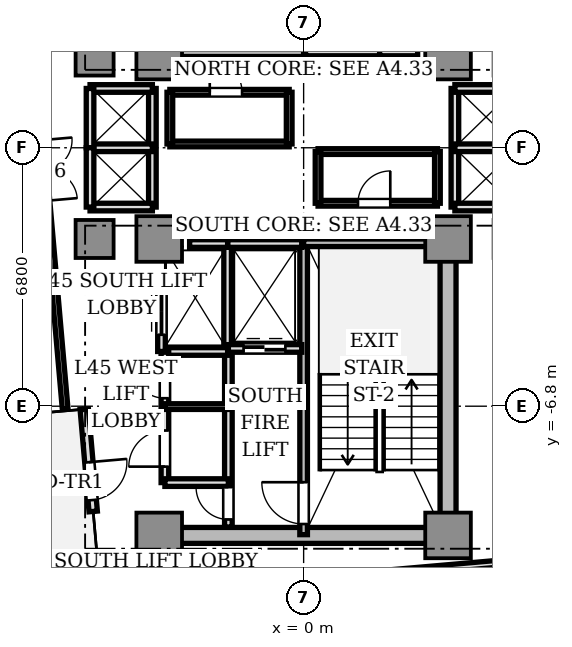
"""IFC4 building model, lengths in metres.
Left out: names, types, materials, properties, quantities, classifications, styles, units other than length and angle.
Written with IfcOpenShell. Run it as: python <this file> out.ifc"""

import sys

from ifc_helpers import new_model, si_unit, direction, frame, frame_2d, origin, origin_2d, place, context, subcontext, project, spatial, rectangle, extrude, source, transform, mapped, element, fill, save


model = new_model("IFC4")
c1 = context("Model", 3, precision=1e-05, world=origin(), true_north=direction((0.0, 1.0)))
c2 = subcontext(c1, "Body", "Model", "MODEL_VIEW")
j1 = project(units=[si_unit("LENGTHUNIT", "METRE"), si_unit("PLANEANGLEUNIT", "RADIAN")], contexts=[c1])
p1 = place(None, origin())
s1 = spatial("IfcSite", under=j1, at=p1, CompositionType="ELEMENT")
p2 = place(p1, origin())
s2 = spatial("IfcBuilding", under=s1, at=p2, CompositionType="ELEMENT")
p3 = place(p2, frame((0.0, 0.0, 164.0)))
s3 = spatial("IfcBuildingStorey", under=s2, at=p3, CompositionType="ELEMENT", Elevation=164.0)
p4 = place(p3, frame((-3.55, -10.2, 0.0), z_axis=(0.0, 0.0, 1.0), x_axis=(1.0, 0.0, 0.0)))
e1 = element("IfcWall", 1, at=p4, inside=s3, PredefinedType="SHEAR", context=c2, shape_type="SweptSolid", body=[
    extrude(rectangle(XDim=7.1, YDim=0.42, at=frame_2d((3.55, 0.0))), origin(), (0.0, 0.0, 1.0), 3.11),
])
p5 = place(p3, frame((3.8, -9.75, 0.0), z_axis=(0.0, 0.0, 1.0), x_axis=(0.0, 1.0, 0.0)))
e2 = element("IfcWall", 2, at=p5, inside=s3, PredefinedType="SHEAR", context=c2, shape_type="SweptSolid", body=[
    extrude(rectangle(XDim=6.9, YDim=0.42, at=frame_2d((3.45, 0.0))), origin(), (0.0, 0.0, 1.0), 3.11),
])
m1 = source(origin(), c2, "Body", "SweptSolid", [
    extrude(rectangle(XDim=1.2, YDim=1.2, at=origin_2d()), origin(), (0.0, 0.0, 1.0), 3.11),
])
for number, where, z_axis, x_axis in (
    (3, (-3.8, 2.4, 0.0), (0.0, 0.0, 1.0), (1.0, 0.0, 0.0)),
    (4, (3.8, 2.4, 0.0), (0.0, 0.0, 1.0), (1.0, 0.0, 0.0)),
    (5, (-3.8, -2.4, 0.0), (0.0, 0.0, 1.0), (1.0, 0.0, 0.0)),
    (6, (3.8, -2.4, 0.0), (0.0, 0.0, 1.0), (1.0, 0.0, 0.0)),
    (7, (-3.8, -10.2, 0.0), (0.0, 0.0, 1.0), (1.0, 0.0, 0.0)),
    (8, (3.8, -10.2, 0.0), (0.0, 0.0, 1.0), (1.0, 0.0, 0.0)),
):
    element("IfcColumn", number, at=place(p3, frame(where, z_axis=z_axis, x_axis=x_axis)), inside=s3, PredefinedType="COLUMN", context=c2, shape_type="MappedRepresentation", body=[
        mapped(m1, transform((0.0, 0.0, 0.0), scale=1.0)),
    ])
m2 = source(origin(), c2, "Body", "SweptSolid", [
    extrude(rectangle(XDim=1.0, YDim=1.0, at=origin_2d()), origin(), (0.0, 0.0, 1.0), 3.11),
])
for number, where, z_axis, x_axis in (
    (9, (-5.5, 2.4, 0.0), (0.0, 0.0, 1.0), (1.0, 0.0, 0.0)),
    (10, (-5.5, -2.4, 0.0), (0.0, 0.0, 1.0), (1.0, 0.0, 0.0)),
):
    element("IfcColumn", number, at=place(p3, frame(where, z_axis=z_axis, x_axis=x_axis)), inside=s3, PredefinedType="COLUMN", context=c2, shape_type="MappedRepresentation", body=[
        mapped(m2, transform((0.0, 0.0, 0.0), scale=1.0)),
    ])
p6 = place(p3, frame((-5.772, -6.879, 0.0), z_axis=(0.0, 0.0, 1.0), x_axis=(0.087168071984, -0.996193619346, 0.0)))
e11 = element("IfcWall", 11, at=p6, inside=s3, PredefinedType="STANDARD", context=c2, shape_type="SweptSolid", body=[
    extrude(rectangle(XDim=2.7, YDim=0.22, at=frame_2d((1.35, 0.0))), origin(), (0.0, 0.0, 1.0), 3.11),
])
p7 = place(p6, frame((1.4, 0.0, 0.0)))
e12 = element("IfcOpeningElement", 12, at=p7, cuts=e11, PredefinedType="OPENING", context=c2, shape_type="SweptSolid", body=[
    extrude(rectangle(XDim=1.0, YDim=2.2, at=frame_2d((0.5, 1.1))), frame((0.0, 0.12, 0.0), z_axis=(0.0, -1.0, 0.0), x_axis=(1.0, 0.0, 0.0)), (0.0, 0.0, 1.0), 0.24),
])
p8 = place(p3, frame((0.0, 2.5, 0.0), z_axis=(0.0, 0.0, 1.0), x_axis=(0.0, 1.0, 0.0)))
e13 = element("IfcWall", 13, at=p8, inside=s3, PredefinedType="SOLIDWALL", context=c2, shape_type="SweptSolid", body=[
    extrude(rectangle(XDim=7.68, YDim=0.2, at=frame_2d((3.84, 0.0))), origin(), (0.0, 0.0, 1.0), 3.11),
])
p9 = place(p8, frame((6.36, 0.0, 0.0)))
e14 = element("IfcOpeningElement", 14, at=p9, cuts=e13, PredefinedType="OPENING", context=c2, shape_type="SweptSolid", body=[
    extrude(rectangle(XDim=1.1, YDim=2.15, at=frame_2d((0.55, 1.075))), frame((0.0, 0.11, 0.0), z_axis=(0.0, -1.0, 0.0), x_axis=(1.0, 0.0, 0.0)), (0.0, 0.0, 1.0), 0.22),
])
p10 = place(p3, frame((-3.72, 2.5, 0.0), z_axis=(0.0, 0.0, 1.0), x_axis=(1.0, 0.0, 0.0)))
e15 = element("IfcWall", 15, at=p10, inside=s3, PredefinedType="SOLIDWALL", context=c2, shape_type="SweptSolid", body=[
    extrude(rectangle(XDim=3.72, YDim=0.2, at=frame_2d((1.86, 0.0))), origin(), (0.0, 0.0, 1.0), 3.11),
])
p11 = place(p3, frame((0.0, -10.18, 0.0), z_axis=(0.0, 0.0, 1.0), x_axis=(0.0, 1.0, 0.0)))
e16 = element("IfcWall", 16, at=p11, inside=s3, PredefinedType="SOLIDWALL", context=c2, shape_type="SweptSolid", body=[
    extrude(rectangle(XDim=7.68, YDim=0.2, at=frame_2d((3.84, 0.0))), origin(), (0.0, 0.0, 1.0), 3.11),
])
p12 = place(p11, frame((0.28, 0.0, 0.0)))
e17 = element("IfcOpeningElement", 17, at=p12, cuts=e16, PredefinedType="OPENING", context=c2, shape_type="SweptSolid", body=[
    extrude(rectangle(XDim=1.1, YDim=2.15, at=frame_2d((0.55, 1.075))), frame((0.0, 0.11, 0.0), z_axis=(0.0, -1.0, 0.0), x_axis=(1.0, 0.0, 0.0)), (0.0, 0.0, 1.0), 0.22),
])
p13 = place(p3, frame((0.0, -2.5, 0.0), z_axis=(0.0, 0.0, 1.0), x_axis=(1.0, 0.0, 0.0)))
e18 = element("IfcWall", 18, at=p13, inside=s3, PredefinedType="SOLIDWALL", context=c2, shape_type="SweptSolid", body=[
    extrude(rectangle(XDim=3.72, YDim=0.2, at=frame_2d((1.86, 0.0))), origin(), (0.0, 0.0, 1.0), 3.11),
])
p14 = place(p3, frame((-1.98, -9.98, 0.0), z_axis=(0.0, 0.0, 1.0), x_axis=(0.0, 1.0, 0.0)))
e19 = element("IfcWall", 19, at=p14, inside=s3, PredefinedType="SOLIDWALL", context=c2, shape_type="SweptSolid", body=[
    extrude(rectangle(XDim=4.66, YDim=0.2, at=frame_2d((2.33, 0.0))), origin(), (0.0, 0.0, 1.0), 2.66),
])
p15 = place(p14, frame((0.2, 0.0, 0.0)))
e20 = element("IfcOpeningElement", 20, at=p15, cuts=e19, PredefinedType="OPENING", context=c2, shape_type="SweptSolid", body=[
    extrude(rectangle(XDim=0.85, YDim=2.1, at=frame_2d((0.425, 1.05))), frame((0.0, 0.11, 0.0), z_axis=(0.0, -1.0, 0.0), x_axis=(1.0, 0.0, 0.0)), (0.0, 0.0, 1.0), 0.22),
])
p16 = place(p3, frame((2.0, 2.5, 0.0), z_axis=(0.0, 0.0, 1.0), x_axis=(0.0, 1.0, 0.0)))
e21 = element("IfcWall", 21, at=p16, inside=s3, PredefinedType="SOLIDWALL", context=c2, shape_type="SweptSolid", body=[
    extrude(rectangle(XDim=2.78, YDim=0.2, at=frame_2d((1.39, 0.0))), origin(), (0.0, 0.0, 1.0), 2.66),
])
p17 = place(p3, frame((0.05, 2.52, 0.0), z_axis=(0.0, 0.0, 1.0), x_axis=(1.0, 0.0, 0.0)))
e22 = element("IfcWall", 22, at=p17, inside=s3, PredefinedType="SOLIDWALL", context=c2, shape_type="SweptSolid", body=[
    extrude(rectangle(XDim=1.95, YDim=0.2, at=frame_2d((0.975, 0.0))), origin(), (0.0, 0.0, 1.0), 2.66),
])
p18 = place(p3, frame((-2.0, -5.28, 0.0), z_axis=(0.0, 0.0, 1.0), x_axis=(0.0, 1.0, 0.0)))
e23 = element("IfcWall", 23, at=p18, inside=s3, PredefinedType="SOLIDWALL", context=c2, shape_type="SweptSolid", body=[
    extrude(rectangle(XDim=2.78, YDim=0.2, at=frame_2d((1.39, 0.0))), origin(), (0.0, 0.0, 1.0), 2.66),
])
p19 = place(p3, frame((-2.0, -2.52, 0.0), z_axis=(0.0, 0.0, 1.0), x_axis=(1.0, 0.0, 0.0)))
e24 = element("IfcWall", 24, at=p19, inside=s3, PredefinedType="SOLIDWALL", context=c2, shape_type="SweptSolid", body=[
    extrude(rectangle(XDim=1.95, YDim=0.2, at=frame_2d((0.975, 0.0))), origin(), (0.0, 0.0, 1.0), 2.66),
])
p20 = place(p3, frame((-1.98, -5.28, 0.0), z_axis=(0.0, 0.0, 1.0), x_axis=(1.0, 0.0, 0.0)))
e25 = element("IfcWall", 25, at=p20, inside=s3, PredefinedType="SOLIDWALL", context=c2, shape_type="SweptSolid", body=[
    extrude(rectangle(XDim=1.93, YDim=0.2, at=frame_2d((0.965, 0.0))), origin(), (0.0, 0.0, 1.0), 2.66),
])
p21 = place(p20, frame((0.4, 0.0, 0.0)))
e26 = element("IfcOpeningElement", 26, at=p21, cuts=e25, PredefinedType="OPENING", context=c2, shape_type="SweptSolid", body=[
    extrude(rectangle(XDim=1.1, YDim=2.2, at=frame_2d((0.55, 1.1))), frame((0.0, 0.11, 0.0), z_axis=(0.0, -1.0, 0.0), x_axis=(1.0, 0.0, 0.0)), (0.0, 0.0, 1.0), 0.22),
])
for number, where, z_axis, x_axis in (
    (27, (2.0, 2.52, 0.0), (0.0, 0.0, 1.0), (1.0, 0.0, 0.0)),
    (28, (-3.0, -2.52, 0.0), (0.0, 0.0, 1.0), (1.0, 0.0, 0.0)),
):
    element("IfcWall", number, at=place(p3, frame(where, z_axis=z_axis, x_axis=x_axis)), inside=s3, PredefinedType="SOLIDWALL", context=c2, shape_type="SweptSolid", body=[
        extrude(rectangle(XDim=1.0, YDim=0.2, at=frame_2d((0.5, 0.0))), origin(), (0.0, 0.0, 1.0), 2.66),
    ])
p22 = place(p3, frame((-3.74, -5.36, 0.0), z_axis=(0.0, 0.0, 1.0), x_axis=(1.0, 0.0, 0.0)))
e29 = element("IfcWall", 29, at=p22, inside=s3, PredefinedType="SOLIDWALL", context=c2, shape_type="SweptSolid", body=[
    extrude(rectangle(XDim=1.74, YDim=0.2, at=frame_2d((0.87, 0.0))), origin(), (0.0, 0.0, 1.0), 2.66),
])
p23 = place(p3, frame((-3.74, -5.36, 0.0), z_axis=(0.0, 0.0, 1.0), x_axis=(0.0, 1.0, 0.0)))
e30 = element("IfcWall", 30, at=p23, inside=s3, PredefinedType="SOLIDWALL", context=c2, shape_type="SweptSolid", body=[
    extrude(rectangle(XDim=2.08, YDim=0.2, at=frame_2d((1.04, 0.0))), origin(), (0.0, 0.0, 1.0), 2.66),
])
p24 = place(p23, frame((0.44, 0.0, 0.0)))
e31 = element("IfcOpeningElement", 31, at=p24, cuts=e30, PredefinedType="OPENING", context=c2, shape_type="SweptSolid", body=[
    extrude(rectangle(XDim=1.2, YDim=2.2, at=frame_2d((0.6, 1.1))), frame((0.0, 0.11, 0.0), z_axis=(0.0, -1.0, 0.0), x_axis=(1.0, 0.0, 0.0)), (0.0, 0.0, 1.0), 0.22),
])
p25 = place(p3, frame((3.98, -1.56, 0.0), z_axis=(0.0, 0.0, 1.0), x_axis=(0.0, 1.0, 0.0)))
e32 = element("IfcWall", 32, at=p25, inside=s3, PredefinedType="SOLIDWALL", context=c2, shape_type="SweptSolid", body=[
    extrude(rectangle(XDim=3.12, YDim=0.2, at=frame_2d((1.56, 0.0))), origin(), (0.0, 0.0, 1.0), 2.28),
])
for number, where, z_axis, x_axis in (
    (33, (3.98, 1.56, 0.0), (0.0, 0.0, 1.0), (1.0, 0.0, 0.0)),
    (34, (3.98, -1.56, 0.0), (0.0, 0.0, 1.0), (1.0, 0.0, 0.0)),
    (35, (3.98, 0.0, 0.0), (0.0, 0.0, 1.0), (1.0, 0.0, 0.0)),
):
    element("IfcWall", number, at=place(p3, frame(where, z_axis=z_axis, x_axis=x_axis)), inside=s3, PredefinedType="SOLIDWALL", context=c2, shape_type="SweptSolid", body=[
        extrude(rectangle(XDim=1.64, YDim=0.2, at=frame_2d((0.82, 0.0))), origin(), (0.0, 0.0, 1.0), 2.66),
    ])
p26 = place(p3, frame((-3.98, -1.56, 0.0), z_axis=(0.0, 0.0, 1.0), x_axis=(0.0, 1.0, 0.0)))
e36 = element("IfcWall", 36, at=p26, inside=s3, PredefinedType="SOLIDWALL", context=c2, shape_type="SweptSolid", body=[
    extrude(rectangle(XDim=3.12, YDim=0.2, at=frame_2d((1.56, 0.0))), origin(), (0.0, 0.0, 1.0), 2.28),
])
for number, where, z_axis, x_axis in (
    (37, (-5.62, 1.56, 0.0), (0.0, 0.0, 1.0), (1.0, 0.0, 0.0)),
    (38, (-5.62, -1.56, 0.0), (0.0, 0.0, 1.0), (1.0, 0.0, 0.0)),
    (39, (-5.62, 0.0, 0.0), (0.0, 0.0, 1.0), (1.0, 0.0, 0.0)),
):
    element("IfcWall", number, at=place(p3, frame(where, z_axis=z_axis, x_axis=x_axis)), inside=s3, PredefinedType="SOLIDWALL", context=c2, shape_type="SweptSolid", body=[
        extrude(rectangle(XDim=1.64, YDim=0.2, at=frame_2d((0.82, 0.0))), origin(), (0.0, 0.0, 1.0), 2.66),
    ])
for number, where, z_axis, x_axis in (
    (40, (-5.62, 0.0, 0.0), (0.0, 0.0, 1.0), (0.0, 1.0, 0.0)),
    (41, (-5.62, -1.56, 0.0), (0.0, 0.0, 1.0), (0.0, 1.0, 0.0)),
):
    element("IfcWall", number, at=place(p3, frame(where, z_axis=z_axis, x_axis=x_axis)), inside=s3, PredefinedType="SOLIDWALL", context=c2, shape_type="SweptSolid", body=[
        extrude(rectangle(XDim=1.56, YDim=0.2, at=frame_2d((0.78, 0.0))), origin(), (0.0, 0.0, 1.0), 2.66),
    ])
p27 = place(p3, frame((-3.65, -8.81, 0.0), z_axis=(0.0, 0.0, 1.0), x_axis=(0.0, 1.0, 0.0)))
e42 = element("IfcWall", 42, at=p27, inside=s3, PredefinedType="SOLIDWALL", context=c2, shape_type="SweptSolid", body=[
    extrude(rectangle(XDim=3.43, YDim=0.2, at=frame_2d((1.715, 0.0))), origin(), (0.0, 0.0, 1.0), 2.66),
])
p28 = place(p27, frame((0.42, 0.0, 0.0)))
e43 = element("IfcOpeningElement", 43, at=p28, cuts=e42, PredefinedType="OPENING", context=c2, shape_type="SweptSolid", body=[
    extrude(rectangle(XDim=0.95, YDim=2.15, at=frame_2d((0.475, 1.075))), frame((0.0, 0.11, 0.0), z_axis=(0.0, -1.0, 0.0), x_axis=(1.0, 0.0, 0.0)), (0.0, 0.0, 1.0), 0.22),
])
p29 = place(p27, frame((2.22, 0.0, 0.0)))
e44 = element("IfcOpeningElement", 44, at=p29, cuts=e42, PredefinedType="OPENING", context=c2, shape_type="SweptSolid", body=[
    extrude(rectangle(XDim=0.85, YDim=2.1, at=frame_2d((0.425, 1.05))), frame((0.0, 0.11, 0.0), z_axis=(0.0, -1.0, 0.0), x_axis=(1.0, 0.0, 0.0)), (0.0, 0.0, 1.0), 0.22),
])
p30 = place(p3, frame((-3.65, -8.81, 0.0), z_axis=(0.0, 0.0, 1.0), x_axis=(1.0, 0.0, 0.0)))
e45 = element("IfcWall", 45, at=p30, inside=s3, PredefinedType="SOLIDWALL", context=c2, shape_type="SweptSolid", body=[
    extrude(rectangle(XDim=1.67, YDim=0.2, at=frame_2d((0.835, 0.0))), origin(), (0.0, 0.0, 1.0), 2.66),
])
p31 = place(p3, frame((-3.65, -6.81, 0.0), z_axis=(0.0, 0.0, 1.0), x_axis=(1.0, 0.0, 0.0)))
e46 = element("IfcWall", 46, at=p31, inside=s3, PredefinedType="PARTITIONING", context=c2, shape_type="SweptSolid", body=[
    extrude(rectangle(XDim=1.67, YDim=0.15, at=frame_2d((0.835, 0.0))), origin(), (0.0, 0.0, 1.0), 2.66),
])
p32 = place(p3, frame((-3.52, 0.1, 0.0), z_axis=(0.0, 0.0, 1.0), x_axis=(1.0, 0.0, 0.0)))
e47 = element("IfcWall", 47, at=p32, inside=s3, PredefinedType="PARTITIONING", context=c2, shape_type="SweptSolid", body=[
    extrude(rectangle(XDim=3.14, YDim=0.15, at=frame_2d((1.57, 0.0))), origin(), (0.0, 0.0, 1.0), 2.66),
])
p33 = place(p3, frame((-3.52, 1.46, 0.0), z_axis=(0.0, 0.0, 1.0), x_axis=(1.0, 0.0, 0.0)))
e48 = element("IfcWall", 48, at=p33, inside=s3, PredefinedType="PARTITIONING", context=c2, shape_type="SweptSolid", body=[
    extrude(rectangle(XDim=3.14, YDim=0.15, at=frame_2d((1.57, 0.0))), origin(), (0.0, 0.0, 1.0), 2.66),
])
p34 = place(p33, frame((1.05, 0.0, 0.0)))
e49 = element("IfcOpeningElement", 49, at=p34, cuts=e48, PredefinedType="OPENING", context=c2, shape_type="SweptSolid", body=[
    extrude(rectangle(XDim=0.85, YDim=2.1, at=frame_2d((0.425, 1.05))), frame((0.0, 0.085, 0.0), z_axis=(0.0, -1.0, 0.0), x_axis=(1.0, 0.0, 0.0)), (0.0, 0.0, 1.0), 0.17),
])
p35 = place(p3, frame((-3.52, 0.1, 0.0), z_axis=(0.0, 0.0, 1.0), x_axis=(0.0, 1.0, 0.0)))
e50 = element("IfcWall", 50, at=p35, inside=s3, PredefinedType="PARTITIONING", context=c2, shape_type="SweptSolid", body=[
    extrude(rectangle(XDim=1.36, YDim=0.15, at=frame_2d((0.68, 0.0))), origin(), (0.0, 0.0, 1.0), 2.28),
])
p36 = place(p3, frame((-0.38, 0.1, 0.0), z_axis=(0.0, 0.0, 1.0), x_axis=(0.0, 1.0, 0.0)))
e51 = element("IfcWall", 51, at=p36, inside=s3, PredefinedType="PARTITIONING", context=c2, shape_type="SweptSolid", body=[
    extrude(rectangle(XDim=1.36, YDim=0.15, at=frame_2d((0.68, 0.0))), origin(), (0.0, 0.0, 1.0), 2.66),
])
p37 = place(p3, frame((0.38, -0.1, 0.0), z_axis=(0.0, 0.0, 1.0), x_axis=(1.0, 0.0, 0.0)))
e52 = element("IfcWall", 52, at=p37, inside=s3, PredefinedType="PARTITIONING", context=c2, shape_type="SweptSolid", body=[
    extrude(rectangle(XDim=3.14, YDim=0.15, at=frame_2d((1.57, 0.0))), origin(), (0.0, 0.0, 1.0), 2.66),
])
p38 = place(p3, frame((0.38, -1.46, 0.0), z_axis=(0.0, 0.0, 1.0), x_axis=(1.0, 0.0, 0.0)))
e53 = element("IfcWall", 53, at=p38, inside=s3, PredefinedType="PARTITIONING", context=c2, shape_type="SweptSolid", body=[
    extrude(rectangle(XDim=3.14, YDim=0.15, at=frame_2d((1.57, 0.0))), origin(), (0.0, 0.0, 1.0), 2.66),
])
p39 = place(p38, frame((1.05, 0.0, 0.0)))
e54 = element("IfcOpeningElement", 54, at=p39, cuts=e53, PredefinedType="OPENING", context=c2, shape_type="SweptSolid", body=[
    extrude(rectangle(XDim=0.85, YDim=2.1, at=frame_2d((0.425, 1.05))), frame((0.0, 0.085, 0.0), z_axis=(0.0, -1.0, 0.0), x_axis=(1.0, 0.0, 0.0)), (0.0, 0.0, 1.0), 0.17),
])
p40 = place(p3, frame((0.38, -1.46, 0.0), z_axis=(0.0, 0.0, 1.0), x_axis=(0.0, 1.0, 0.0)))
e55 = element("IfcWall", 55, at=p40, inside=s3, PredefinedType="PARTITIONING", context=c2, shape_type="SweptSolid", body=[
    extrude(rectangle(XDim=1.36, YDim=0.15, at=frame_2d((0.68, 0.0))), origin(), (0.0, 0.0, 1.0), 2.66),
])
p41 = place(p3, frame((3.52, -1.46, 0.0), z_axis=(0.0, 0.0, 1.0), x_axis=(0.0, 1.0, 0.0)))
e56 = element("IfcWall", 56, at=p41, inside=s3, PredefinedType="PARTITIONING", context=c2, shape_type="SweptSolid", body=[
    extrude(rectangle(XDim=1.36, YDim=0.15, at=frame_2d((0.68, 0.0))), origin(), (0.0, 0.0, 1.0), 2.28),
])
p42 = place(p3, frame((-7.373, 5.679, 0.0), z_axis=(0.0, 0.0, 1.0), x_axis=(0.087154691724, -0.996194790044, 0.0)))
e57 = element("IfcWall", 57, at=p42, inside=s3, PredefinedType="PARTITIONING", context=c2, shape_type="SweptSolid", body=[
    extrude(rectangle(XDim=12.6, YDim=0.15, at=frame_2d((6.3, 0.0))), origin(), (0.0, 0.0, 1.0), 2.66),
])
p43 = place(p42, frame((5.5, 0.0, 0.0)))
e58 = element("IfcOpeningElement", 58, at=p43, cuts=e57, PredefinedType="OPENING", context=c2, shape_type="SweptSolid", body=[
    extrude(rectangle(XDim=1.6, YDim=2.25, at=frame_2d((0.8, 1.125))), frame((0.0, 0.085, 0.0), z_axis=(0.0, -1.0, 0.0), x_axis=(1.0, 0.0, 0.0)), (0.0, 0.0, 1.0), 0.17),
])
p44 = place(p3, frame((1.936, -11.224, 0.0), z_axis=(0.0, 0.0, 1.0), x_axis=(0.996194212812, 0.087161289348, 0.0)))
e59 = element("IfcWall", 59, at=p44, inside=s3, PredefinedType="PARTITIONING", context=c2, shape_type="SweptSolid", body=[
    extrude(rectangle(XDim=5.35, YDim=0.18, at=frame_2d((2.675, 0.0))), origin(), (0.0, 0.0, 1.0), 2.66),
])
m3 = source(origin(), c2, "Body", "SweptSolid", [
    extrude(rectangle(XDim=1.0, YDim=0.05, at=origin_2d()), origin(), (0.0, 0.0, 1.0), 2.2),
])
p45 = place(p7, frame((0.5, 0.0, 0.0)))
e60 = element("IfcDoor", 60, at=p45, inside=s3, OperationType="SINGLE_SWING_LEFT", PredefinedType="DOOR", context=c2, shape_type="MappedRepresentation", body=[
    mapped(m3, transform((0.0, 0.0, 0.0), scale=1.0)),
])
fill(e12, e60)
m4 = source(origin(), c2, "Body", "SweptSolid", [
    extrude(rectangle(XDim=1.1, YDim=0.05, at=origin_2d()), origin(), (0.0, 0.0, 1.0), 2.15),
])
p46 = place(p12, frame((0.55, 0.0, 0.0)))
e61 = element("IfcDoor", 61, at=p46, inside=s3, OperationType="SINGLE_SWING_RIGHT", PredefinedType="DOOR", context=c2, shape_type="MappedRepresentation", body=[
    mapped(m4, transform((0.0, 0.0, 0.0), scale=1.0)),
])
fill(e17, e61)
m5 = source(origin(), c2, "Body", "SweptSolid", [
    extrude(rectangle(XDim=0.85, YDim=0.05, at=origin_2d()), origin(), (0.0, 0.0, 1.0), 2.1),
])
p47 = place(p15, frame((0.425, 0.0, 0.0)))
e62 = element("IfcDoor", 62, at=p47, inside=s3, OperationType="SINGLE_SWING_RIGHT", PredefinedType="DOOR", context=c2, shape_type="MappedRepresentation", body=[
    mapped(m5, transform((0.0, 0.0, 0.0), scale=1.0)),
])
fill(e20, e62)
m6 = source(origin(), c2, "Body", "SweptSolid", [
    extrude(rectangle(XDim=1.1, YDim=0.05, at=origin_2d()), origin(), (0.0, 0.0, 1.0), 2.2),
])
p48 = place(p21, frame((0.55, 0.0, 0.0)))
e63 = element("IfcDoor", 63, at=p48, inside=s3, OperationType="DOUBLE_DOOR_SLIDING", PredefinedType="DOOR", context=c2, shape_type="MappedRepresentation", body=[
    mapped(m6, transform((0.0, 0.0, 0.0), scale=1.0)),
])
fill(e26, e63)
m7 = source(origin(), c2, "Body", "SweptSolid", [
    extrude(rectangle(XDim=1.2, YDim=0.05, at=origin_2d()), origin(), (0.0, 0.0, 1.0), 2.2),
])
p49 = place(p24, frame((0.6, 0.0, 0.0)))
e64 = element("IfcDoor", 64, at=p49, inside=s3, OperationType="DOUBLE_DOOR_SLIDING", PredefinedType="DOOR", context=c2, shape_type="MappedRepresentation", body=[
    mapped(m7, transform((0.0, 0.0, 0.0), scale=1.0)),
])
fill(e31, e64)
m8 = source(origin(), c2, "Body", "SweptSolid", [
    extrude(rectangle(XDim=0.95, YDim=0.05, at=origin_2d()), origin(), (0.0, 0.0, 1.0), 2.15),
])
p50 = place(p28, frame((0.475, 0.0, 0.0)))
e65 = element("IfcDoor", 65, at=p50, inside=s3, OperationType="SINGLE_SWING_LEFT", PredefinedType="DOOR", context=c2, shape_type="MappedRepresentation", body=[
    mapped(m8, transform((0.0, 0.0, 0.0), scale=1.0)),
])
fill(e43, e65)
p51 = place(p29, frame((0.425, 0.0, 0.0)))
e66 = element("IfcDoor", 66, at=p51, inside=s3, OperationType="SINGLE_SWING_RIGHT", PredefinedType="DOOR", context=c2, shape_type="MappedRepresentation", body=[
    mapped(m5, transform((0.0, 0.0, 0.0), scale=1.0)),
])
fill(e44, e66)
p52 = place(p34, frame((0.425, 0.0, 0.0)))
e67 = element("IfcDoor", 67, at=p52, inside=s3, OperationType="SINGLE_SWING_LEFT", PredefinedType="DOOR", context=c2, shape_type="MappedRepresentation", body=[
    mapped(m5, transform((0.0, 0.0, 0.0), scale=1.0)),
])
fill(e49, e67)
p53 = place(p39, frame((0.425, 0.0, 0.0)))
e68 = element("IfcDoor", 68, at=p53, inside=s3, OperationType="SINGLE_SWING_RIGHT", PredefinedType="DOOR", context=c2, shape_type="MappedRepresentation", body=[
    mapped(m5, transform((0.0, 0.0, 0.0), scale=1.0)),
])
fill(e54, e68)
save(model, sys.argv[1])
